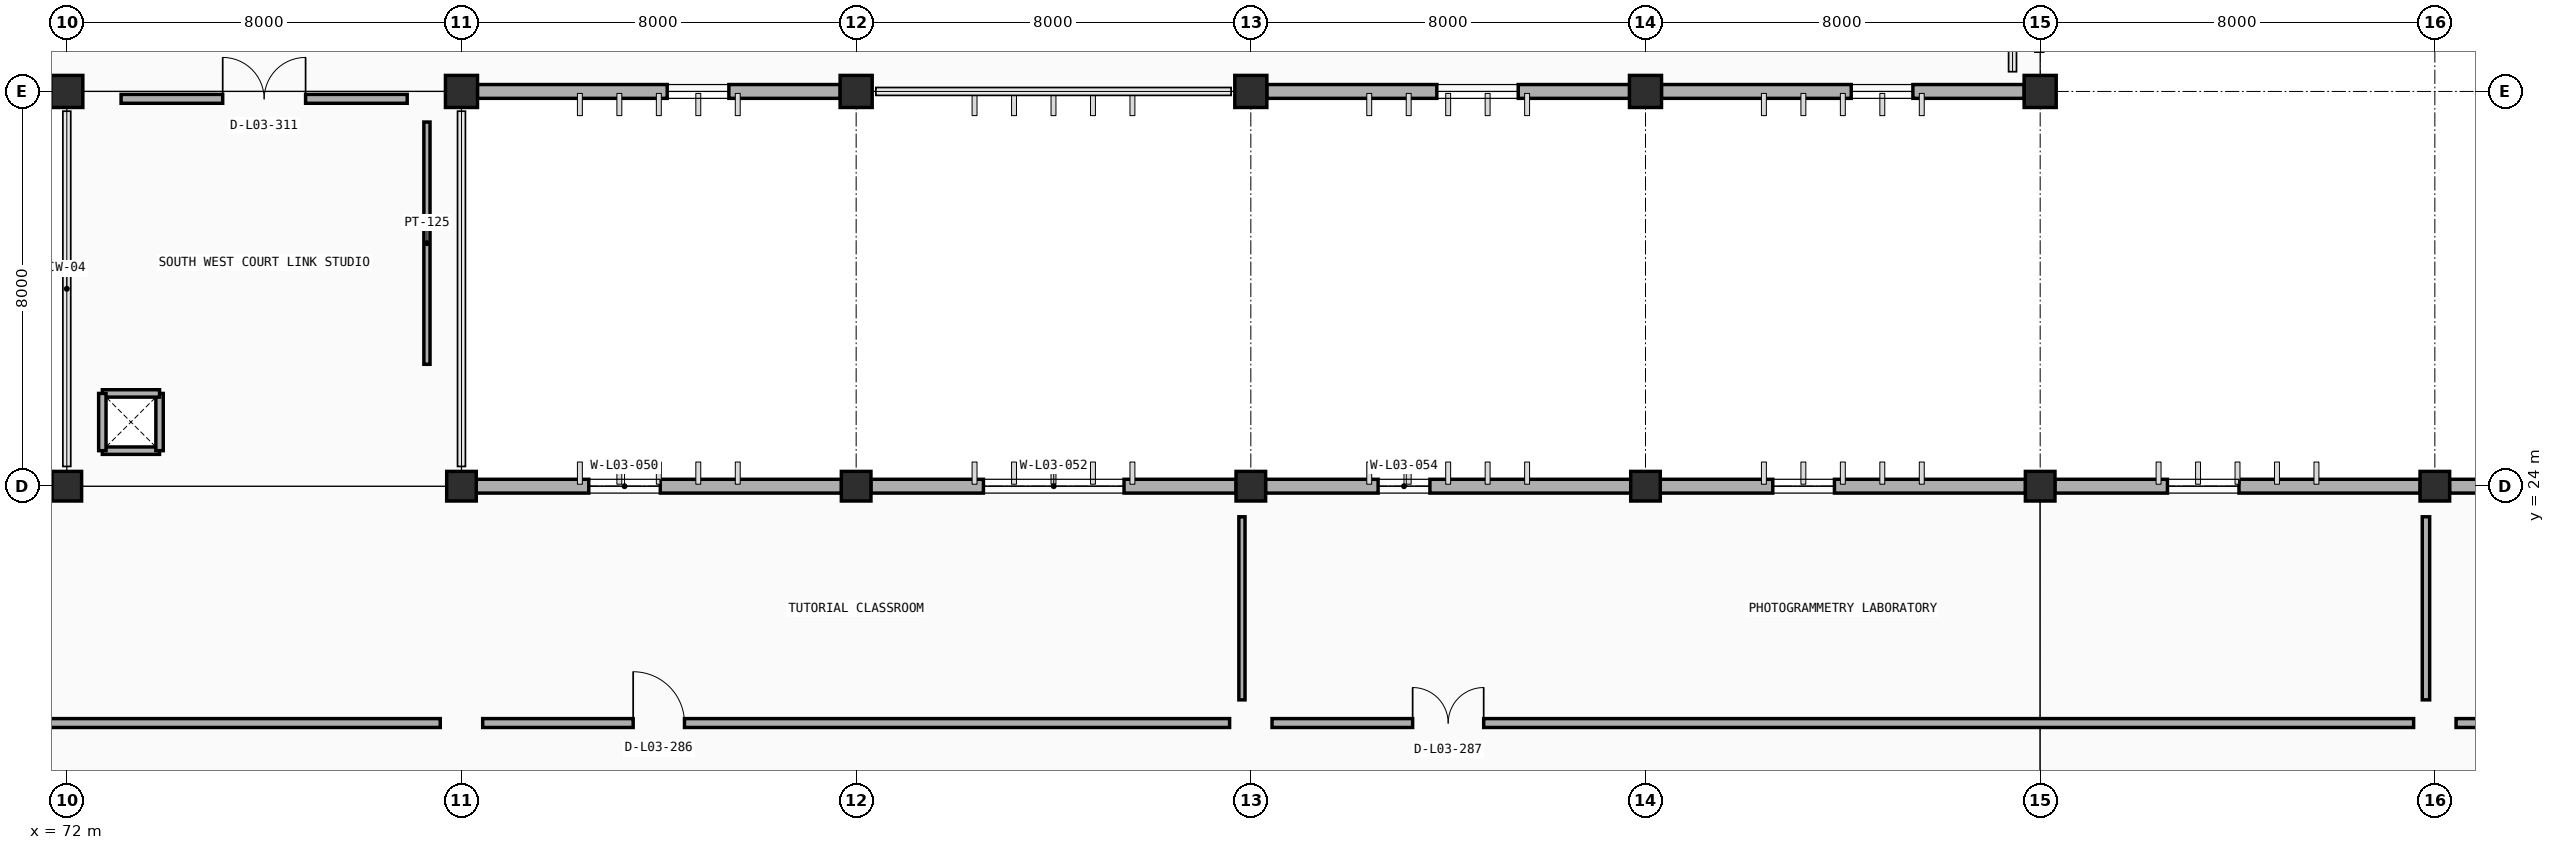
"""IFC4 building model, lengths in metres.
Left out: names, types, materials, properties, quantities, classifications, styles, units other than length and angle.
Written with IfcOpenShell. Run it as: python <this file> out.ifc"""

import sys

from ifc_helpers import new_model, si_unit, direction, frame, frame_2d, origin, origin_2d, place, context, subcontext, project, spatial, rectangle, extrude, element, fill, save


model = new_model("IFC4")
c1 = context("Model", 3, precision=1e-05, world=origin(), true_north=direction((0.0, 1.0)))
c2 = subcontext(c1, "Body", "Model", "MODEL_VIEW")
j1 = project(units=[si_unit("LENGTHUNIT", "METRE"), si_unit("PLANEANGLEUNIT", "RADIAN")], contexts=[c1])
p1 = place(None, origin())
s1 = spatial("IfcSite", under=j1, at=p1, CompositionType="ELEMENT")
p2 = place(p1, origin())
s2 = spatial("IfcBuilding", under=s1, at=p2, CompositionType="ELEMENT")
p3 = place(p2, frame((0.0, 0.0, 9.6)))
s3 = spatial("IfcBuildingStorey", under=s2, at=p3, CompositionType="ELEMENT", Elevation=9.6)
for number, where, z_axis, x_axis in (
    (1, (72.0, 24.0, 0.0), (0.0, 0.0, 1.0), (1.0, 0.0, 0.0)),
    (2, (80.0, 24.0, 0.0), (0.0, 0.0, 1.0), (1.0, 0.0, 0.0)),
    (3, (88.0, 24.0, 0.0), (0.0, 0.0, 1.0), (1.0, 0.0, 0.0)),
    (4, (96.0, 24.0, 0.0), (0.0, 0.0, 1.0), (1.0, 0.0, 0.0)),
    (5, (104.0, 24.0, 0.0), (0.0, 0.0, 1.0), (1.0, 0.0, 0.0)),
    (6, (112.0, 24.0, 0.0), (0.0, 0.0, 1.0), (1.0, 0.0, 0.0)),
    (7, (120.0, 24.0, 0.0), (0.0, 0.0, 1.0), (1.0, 0.0, 0.0)),
):
    element("IfcColumn", number, at=place(p3, frame(where, z_axis=z_axis, x_axis=x_axis)), inside=s3, PredefinedType="COLUMN", context=c2, shape_type="SweptSolid", body=[
        extrude(rectangle(XDim=0.6, YDim=0.6, at=origin_2d()), origin(), (0.0, 0.0, 1.0), 4.2),
    ])
for number, where, z_axis, x_axis in (
    (8, (72.0, 32.0, 0.0), (0.0, 0.0, 1.0), (1.0, 0.0, 0.0)),
    (9, (80.0, 32.0, 0.0), (0.0, 0.0, 1.0), (1.0, 0.0, 0.0)),
    (10, (88.0, 32.0, 0.0), (0.0, 0.0, 1.0), (1.0, 0.0, 0.0)),
    (11, (96.0, 32.0, 0.0), (0.0, 0.0, 1.0), (1.0, 0.0, 0.0)),
    (12, (104.0, 32.0, 0.0), (0.0, 0.0, 1.0), (1.0, 0.0, 0.0)),
    (13, (112.0, 32.0, 0.0), (0.0, 0.0, 1.0), (1.0, 0.0, 0.0)),
):
    element("IfcColumn", number, at=place(p3, frame(where, z_axis=z_axis, x_axis=x_axis)), inside=s3, PredefinedType="COLUMN", context=c2, shape_type="SweptSolid", body=[
        extrude(rectangle(XDim=0.65, YDim=0.65, at=origin_2d()), origin(), (0.0, 0.0, 1.0), 4.2),
    ])
p4 = place(p3, frame((64.297, 24.0, 0.0), z_axis=(0.0, 0.0, 1.0), x_axis=(1.0, 0.0, 0.0)))
e14 = element("IfcWall", 14, at=p4, inside=s3, PredefinedType="STANDARD", context=c2, shape_type="SweptSolid", body=[
    extrude(rectangle(XDim=7.406, YDim=0.28, at=frame_2d((3.703, 0.0))), origin(), (0.0, 0.0, 1.0), 3.325),
])
p5 = place(p4, frame((2.283, 0.0, 0.9)))
e15 = element("IfcOpeningElement", 15, at=p5, cuts=e14, PredefinedType="OPENING", context=c2, shape_type="SweptSolid", body=[
    extrude(rectangle(XDim=1.05, YDim=1.4, at=frame_2d((0.525, 0.7))), frame((0.0, 0.15, 0.0), z_axis=(0.0, -1.0, 0.0), x_axis=(1.0, 0.0, 0.0)), (0.0, 0.0, 1.0), 0.3),
])
p6 = place(p3, frame((80.297, 24.0, 0.0), z_axis=(0.0, 0.0, 1.0), x_axis=(1.0, 0.0, 0.0)))
e16 = element("IfcWall", 16, at=p6, inside=s3, PredefinedType="STANDARD", context=c2, shape_type="SweptSolid", body=[
    extrude(rectangle(XDim=7.406, YDim=0.28, at=frame_2d((3.703, 0.0))), origin(), (0.0, 0.0, 1.0), 3.325),
])
p7 = place(p6, frame((2.283, 0.0, 0.9)))
e17 = element("IfcOpeningElement", 17, at=p7, cuts=e16, PredefinedType="OPENING", context=c2, shape_type="SweptSolid", body=[
    extrude(rectangle(XDim=1.45, YDim=1.4, at=frame_2d((0.725, 0.7))), frame((0.0, 0.15, 0.0), z_axis=(0.0, -1.0, 0.0), x_axis=(1.0, 0.0, 0.0)), (0.0, 0.0, 1.0), 0.3),
])
p8 = place(p3, frame((88.297, 24.0, 0.0), z_axis=(0.0, 0.0, 1.0), x_axis=(1.0, 0.0, 0.0)))
e18 = element("IfcWall", 18, at=p8, inside=s3, PredefinedType="STANDARD", context=c2, shape_type="SweptSolid", body=[
    extrude(rectangle(XDim=7.406, YDim=0.28, at=frame_2d((3.703, 0.0))), origin(), (0.0, 0.0, 1.0), 3.325),
])
p9 = place(p8, frame((2.283, 0.0, 0.9)))
e19 = element("IfcOpeningElement", 19, at=p9, cuts=e18, PredefinedType="OPENING", context=c2, shape_type="SweptSolid", body=[
    extrude(rectangle(XDim=2.85, YDim=1.25, at=frame_2d((1.425, 0.625))), frame((0.0, 0.15, 0.0), z_axis=(0.0, -1.0, 0.0), x_axis=(1.0, 0.0, 0.0)), (0.0, 0.0, 1.0), 0.3),
])
p10 = place(p3, frame((96.297, 24.0, 0.0), z_axis=(0.0, 0.0, 1.0), x_axis=(1.0, 0.0, 0.0)))
e20 = element("IfcWall", 20, at=p10, inside=s3, PredefinedType="STANDARD", context=c2, shape_type="SweptSolid", body=[
    extrude(rectangle(XDim=7.406, YDim=0.28, at=frame_2d((3.703, 0.0))), origin(), (0.0, 0.0, 1.0), 3.325),
])
p11 = place(p10, frame((2.283, 0.0, 0.9)))
e21 = element("IfcOpeningElement", 21, at=p11, cuts=e20, PredefinedType="OPENING", context=c2, shape_type="SweptSolid", body=[
    extrude(rectangle(XDim=1.05, YDim=1.4, at=frame_2d((0.525, 0.7))), frame((0.0, 0.15, 0.0), z_axis=(0.0, -1.0, 0.0), x_axis=(1.0, 0.0, 0.0)), (0.0, 0.0, 1.0), 0.3),
])
p12 = place(p3, frame((104.297, 24.0, 0.0), z_axis=(0.0, 0.0, 1.0), x_axis=(1.0, 0.0, 0.0)))
e22 = element("IfcWall", 22, at=p12, inside=s3, PredefinedType="STANDARD", context=c2, shape_type="SweptSolid", body=[
    extrude(rectangle(XDim=7.406, YDim=0.28, at=frame_2d((3.703, 0.0))), origin(), (0.0, 0.0, 1.0), 3.325),
])
p13 = place(p12, frame((2.283, 0.0, 0.9)))
e23 = element("IfcOpeningElement", 23, at=p13, cuts=e22, PredefinedType="OPENING", context=c2, shape_type="SweptSolid", body=[
    extrude(rectangle(XDim=1.25, YDim=1.4, at=frame_2d((0.625, 0.7))), frame((0.0, 0.15, 0.0), z_axis=(0.0, -1.0, 0.0), x_axis=(1.0, 0.0, 0.0)), (0.0, 0.0, 1.0), 0.3),
])
p14 = place(p3, frame((112.297, 24.0, 0.0), z_axis=(0.0, 0.0, 1.0), x_axis=(1.0, 0.0, 0.0)))
e24 = element("IfcWall", 24, at=p14, inside=s3, PredefinedType="STANDARD", context=c2, shape_type="SweptSolid", body=[
    extrude(rectangle(XDim=7.406, YDim=0.28, at=frame_2d((3.703, 0.0))), origin(), (0.0, 0.0, 1.0), 3.325),
])
p15 = place(p14, frame((2.283, 0.0, 0.9)))
e25 = element("IfcOpeningElement", 25, at=p15, cuts=e24, PredefinedType="OPENING", context=c2, shape_type="SweptSolid", body=[
    extrude(rectangle(XDim=1.45, YDim=1.4, at=frame_2d((0.725, 0.7))), frame((0.0, 0.15, 0.0), z_axis=(0.0, -1.0, 0.0), x_axis=(1.0, 0.0, 0.0)), (0.0, 0.0, 1.0), 0.3),
])
p16 = place(p3, frame((120.297, 24.0, 0.0), z_axis=(0.0, 0.0, 1.0), x_axis=(1.0, 0.0, 0.0)))
e26 = element("IfcWall", 26, at=p16, inside=s3, PredefinedType="STANDARD", context=c2, shape_type="SweptSolid", body=[
    extrude(rectangle(XDim=7.406, YDim=0.28, at=frame_2d((3.703, 0.0))), origin(), (0.0, 0.0, 1.0), 3.325),
])
p17 = place(p16, frame((2.283, 0.0, 0.9)))
e27 = element("IfcOpeningElement", 27, at=p17, cuts=e26, PredefinedType="OPENING", context=c2, shape_type="SweptSolid", body=[
    extrude(rectangle(XDim=2.85, YDim=1.25, at=frame_2d((1.425, 0.625))), frame((0.0, 0.15, 0.0), z_axis=(0.0, -1.0, 0.0), x_axis=(1.0, 0.0, 0.0)), (0.0, 0.0, 1.0), 0.3),
])
p18 = place(p3, frame((87.678, 32.0, 0.0), z_axis=(0.0, 0.0, 1.0), x_axis=(-1.0, 0.0, 0.0)))
e28 = element("IfcWall", 28, at=p18, inside=s3, PredefinedType="STANDARD", context=c2, shape_type="SweptSolid", body=[
    extrude(rectangle(XDim=7.356, YDim=0.28, at=frame_2d((3.678, 0.0))), origin(), (0.0, 0.0, 1.0), 3.325),
])
p19 = place(p18, frame((2.258, 0.0, 0.9)))
e29 = element("IfcOpeningElement", 29, at=p19, cuts=e28, PredefinedType="OPENING", context=c2, shape_type="SweptSolid", body=[
    extrude(rectangle(XDim=1.25, YDim=1.55, at=frame_2d((0.625, 0.775))), frame((0.0, 0.15, 0.0), z_axis=(0.0, -1.0, 0.0), x_axis=(1.0, 0.0, 0.0)), (0.0, 0.0, 1.0), 0.3),
])
p20 = place(p3, frame((103.678, 32.0, 0.0), z_axis=(0.0, 0.0, 1.0), x_axis=(-1.0, 0.0, 0.0)))
e30 = element("IfcWall", 30, at=p20, inside=s3, PredefinedType="STANDARD", context=c2, shape_type="SweptSolid", body=[
    extrude(rectangle(XDim=7.356, YDim=0.28, at=frame_2d((3.678, 0.0))), origin(), (0.0, 0.0, 1.0), 3.325),
])
p21 = place(p20, frame((2.258, 0.0, 0.9)))
e31 = element("IfcOpeningElement", 31, at=p21, cuts=e30, PredefinedType="OPENING", context=c2, shape_type="SweptSolid", body=[
    extrude(rectangle(XDim=1.65, YDim=1.55, at=frame_2d((0.825, 0.775))), frame((0.0, 0.15, 0.0), z_axis=(0.0, -1.0, 0.0), x_axis=(1.0, 0.0, 0.0)), (0.0, 0.0, 1.0), 0.3),
])
p22 = place(p3, frame((111.678, 32.0, 0.0), z_axis=(0.0, 0.0, 1.0), x_axis=(-1.0, 0.0, 0.0)))
e32 = element("IfcWall", 32, at=p22, inside=s3, PredefinedType="STANDARD", context=c2, shape_type="SweptSolid", body=[
    extrude(rectangle(XDim=7.356, YDim=0.28, at=frame_2d((3.678, 0.0))), origin(), (0.0, 0.0, 1.0), 3.325),
])
p23 = place(p22, frame((2.258, 0.0, 0.9)))
e33 = element("IfcOpeningElement", 33, at=p23, cuts=e32, PredefinedType="OPENING", context=c2, shape_type="SweptSolid", body=[
    extrude(rectangle(XDim=1.25, YDim=1.55, at=frame_2d((0.625, 0.775))), frame((0.0, 0.15, 0.0), z_axis=(0.0, -1.0, 0.0), x_axis=(1.0, 0.0, 0.0)), (0.0, 0.0, 1.0), 0.3),
])
p24 = place(p3, frame((111.76, 32.22, 0.0), z_axis=(0.0, 0.0, 1.0), x_axis=(-1.0, 0.0, 0.0)))
e34 = element("IfcWall", 34, at=p24, inside=s3, PredefinedType="PARAPET", context=c2, shape_type="SweptSolid", body=[
    extrude(rectangle(XDim=0.32, YDim=0.2, at=frame_2d((0.16, 0.0))), origin(), (0.0, 0.0, 1.0), 3.35),
])
for number, where, z_axis, x_axis in (
    (35, (72.72, 24.72, 0.0), (0.0, 0.0, 1.0), (1.0, 0.0, 0.0)),
    (36, (73.88, 24.72, 0.0), (0.0, 0.0, 1.0), (0.0, 1.0, 0.0)),
    (37, (73.88, 25.88, 0.0), (0.0, 0.0, 1.0), (-1.0, 0.0, 0.0)),
    (38, (72.72, 25.88, 0.0), (0.0, 0.0, 1.0), (0.0, -1.0, 0.0)),
):
    element("IfcWall", number, at=place(p3, frame(where, z_axis=z_axis, x_axis=x_axis)), inside=s3, PredefinedType="PARTITIONING", context=c2, shape_type="SweptSolid", body=[
        extrude(rectangle(XDim=1.16, YDim=0.15, at=frame_2d((0.58, 0.0))), origin(), (0.0, 0.0, 1.0), 3.9),
    ])
p25 = place(p3, frame((56.43, 19.2, 0.0), z_axis=(0.0, 0.0, 1.0), x_axis=(1.0, 0.0, 0.0)))
e39 = element("IfcWall", 39, at=p25, inside=s3, PredefinedType="PARTITIONING", context=c2, shape_type="SweptSolid", body=[
    extrude(rectangle(XDim=23.14, YDim=0.18, at=frame_2d((11.57, 0.0))), origin(), (0.0, 0.0, 1.0), 3.3),
])
p26 = place(p25, frame((3.07, 0.0, 0.0)))
e40 = element("IfcOpeningElement", 40, at=p26, cuts=e39, PredefinedType="OPENING", context=c2, shape_type="SweptSolid", body=[
    extrude(rectangle(XDim=1.0, YDim=2.15, at=frame_2d((0.5, 1.075))), frame((0.0, 0.1, 0.0), z_axis=(0.0, -1.0, 0.0), x_axis=(1.0, 0.0, 0.0)), (0.0, 0.0, 1.0), 0.2),
])
p27 = place(p3, frame((80.43, 19.2, 0.0), z_axis=(0.0, 0.0, 1.0), x_axis=(1.0, 0.0, 0.0)))
e41 = element("IfcWall", 41, at=p27, inside=s3, PredefinedType="PARTITIONING", context=c2, shape_type="SweptSolid", body=[
    extrude(rectangle(XDim=15.14, YDim=0.18, at=frame_2d((7.57, 0.0))), origin(), (0.0, 0.0, 1.0), 3.3),
])
p28 = place(p27, frame((3.05, 0.0, 0.0)))
e42 = element("IfcOpeningElement", 42, at=p28, cuts=e41, PredefinedType="OPENING", context=c2, shape_type="SweptSolid", body=[
    extrude(rectangle(XDim=1.04, YDim=2.15, at=frame_2d((0.52, 1.075))), frame((0.0, 0.1, 0.0), z_axis=(0.0, -1.0, 0.0), x_axis=(1.0, 0.0, 0.0)), (0.0, 0.0, 1.0), 0.2),
])
p29 = place(p3, frame((95.82, 19.67, 0.0), z_axis=(0.0, 0.0, 1.0), x_axis=(0.0, 1.0, 0.0)))
e43 = element("IfcWall", 43, at=p29, inside=s3, PredefinedType="PARTITIONING", context=c2, shape_type="SweptSolid", body=[
    extrude(rectangle(XDim=3.71, YDim=0.125, at=frame_2d((1.855, 0.0))), origin(), (0.0, 0.0, 1.0), 3.225),
])
p30 = place(p3, frame((96.43, 19.2, 0.0), z_axis=(0.0, 0.0, 1.0), x_axis=(1.0, 0.0, 0.0)))
e44 = element("IfcWall", 44, at=p30, inside=s3, PredefinedType="PARTITIONING", context=c2, shape_type="SweptSolid", body=[
    extrude(rectangle(XDim=23.14, YDim=0.18, at=frame_2d((11.57, 0.0))), origin(), (0.0, 0.0, 1.0), 3.3),
])
p31 = place(p30, frame((2.85, 0.0, 0.0)))
e45 = element("IfcOpeningElement", 45, at=p31, cuts=e44, PredefinedType="OPENING", context=c2, shape_type="SweptSolid", body=[
    extrude(rectangle(XDim=1.44, YDim=2.2, at=frame_2d((0.72, 1.1))), frame((0.0, 0.1, 0.0), z_axis=(0.0, -1.0, 0.0), x_axis=(1.0, 0.0, 0.0)), (0.0, 0.0, 1.0), 0.2),
])
p32 = place(p3, frame((119.82, 19.67, 0.0), z_axis=(0.0, 0.0, 1.0), x_axis=(0.0, 1.0, 0.0)))
e46 = element("IfcWall", 46, at=p32, inside=s3, PredefinedType="PARTITIONING", context=c2, shape_type="SweptSolid", body=[
    extrude(rectangle(XDim=3.71, YDim=0.15, at=frame_2d((1.855, 0.0))), origin(), (0.0, 0.0, 1.0), 3.225),
])
p33 = place(p3, frame((120.43, 19.2, 0.0), z_axis=(0.0, 0.0, 1.0), x_axis=(1.0, 0.0, 0.0)))
e47 = element("IfcWall", 47, at=p33, inside=s3, PredefinedType="PARTITIONING", context=c2, shape_type="SweptSolid", body=[
    extrude(rectangle(XDim=23.14, YDim=0.18, at=frame_2d((11.57, 0.0))), origin(), (0.0, 0.0, 1.0), 3.3),
])
p34 = place(p33, frame((2.74, 0.0, 0.0)))
e48 = element("IfcOpeningElement", 48, at=p34, cuts=e47, PredefinedType="OPENING", context=c2, shape_type="SweptSolid", body=[
    extrude(rectangle(XDim=1.66, YDim=2.22, at=frame_2d((0.83, 1.11))), frame((0.0, 0.1, 0.0), z_axis=(0.0, -1.0, 0.0), x_axis=(1.0, 0.0, 0.0)), (0.0, 0.0, 1.0), 0.2),
])
p35 = place(p3, frame((73.1, 31.85, 0.0), z_axis=(0.0, 0.0, 1.0), x_axis=(1.0, 0.0, 0.0)))
e49 = element("IfcWall", 49, at=p35, inside=s3, PredefinedType="PARTITIONING", context=c2, shape_type="SweptSolid", body=[
    extrude(rectangle(XDim=5.8, YDim=0.18, at=frame_2d((2.9, 0.0))), origin(), (0.0, 0.0, 1.0), 3.3),
])
p36 = place(p35, frame((2.06, 0.0, 0.0)))
e50 = element("IfcOpeningElement", 50, at=p36, cuts=e49, PredefinedType="OPENING", context=c2, shape_type="SweptSolid", body=[
    extrude(rectangle(XDim=1.68, YDim=2.25, at=frame_2d((0.84, 1.125))), frame((0.0, 0.1, 0.0), z_axis=(0.0, -1.0, 0.0), x_axis=(1.0, 0.0, 0.0)), (0.0, 0.0, 1.0), 0.2),
])
p37 = place(p3, frame((79.3, 26.47, 0.0), z_axis=(0.0, 0.0, 1.0), x_axis=(0.0, 1.0, 0.0)))
e51 = element("IfcWall", 51, at=p37, inside=s3, PredefinedType="PARTITIONING", context=c2, shape_type="SweptSolid", body=[
    extrude(rectangle(XDim=4.91, YDim=0.125, at=frame_2d((2.455, 0.0))), origin(), (0.0, 0.0, 1.0), 3.3),
])
p38 = place(p7, origin())
e52 = element("IfcWindow", 52, at=p38, inside=s3, PartitioningType="SINGLE_PANEL", PredefinedType="WINDOW", context=c2, shape_type="SweptSolid", body=[
    extrude(rectangle(XDim=1.45, YDim=1.4, at=frame_2d((0.725, 0.7))), frame((0.0, 0.03, 0.0), z_axis=(0.0, -1.0, 0.0), x_axis=(1.0, 0.0, 0.0)), (0.0, 0.0, 1.0), 0.06),
])
fill(e17, e52)
p39 = place(p9, origin())
e53 = element("IfcWindow", 53, at=p39, inside=s3, PartitioningType="DOUBLE_PANEL_VERTICAL", PredefinedType="WINDOW", context=c2, shape_type="SweptSolid", body=[
    extrude(rectangle(XDim=2.85, YDim=1.25, at=frame_2d((1.425, 0.625))), frame((0.0, 0.03, 0.0), z_axis=(0.0, -1.0, 0.0), x_axis=(1.0, 0.0, 0.0)), (0.0, 0.0, 1.0), 0.06),
])
fill(e19, e53)
p40 = place(p11, origin())
e54 = element("IfcWindow", 54, at=p40, inside=s3, PartitioningType="SINGLE_PANEL", PredefinedType="WINDOW", context=c2, shape_type="SweptSolid", body=[
    extrude(rectangle(XDim=1.05, YDim=1.4, at=frame_2d((0.525, 0.7))), frame((0.0, 0.03, 0.0), z_axis=(0.0, -1.0, 0.0), x_axis=(1.0, 0.0, 0.0)), (0.0, 0.0, 1.0), 0.06),
])
fill(e21, e54)
p41 = place(p13, origin())
e55 = element("IfcWindow", 55, at=p41, inside=s3, PartitioningType="SINGLE_PANEL", PredefinedType="WINDOW", context=c2, shape_type="SweptSolid", body=[
    extrude(rectangle(XDim=1.25, YDim=1.4, at=frame_2d((0.625, 0.7))), frame((0.0, 0.03, 0.0), z_axis=(0.0, -1.0, 0.0), x_axis=(1.0, 0.0, 0.0)), (0.0, 0.0, 1.0), 0.06),
])
fill(e23, e55)
p42 = place(p15, origin())
e56 = element("IfcWindow", 56, at=p42, inside=s3, PartitioningType="SINGLE_PANEL", PredefinedType="WINDOW", context=c2, shape_type="SweptSolid", body=[
    extrude(rectangle(XDim=1.45, YDim=1.4, at=frame_2d((0.725, 0.7))), frame((0.0, 0.03, 0.0), z_axis=(0.0, -1.0, 0.0), x_axis=(1.0, 0.0, 0.0)), (0.0, 0.0, 1.0), 0.06),
])
fill(e25, e56)
p43 = place(p19, origin())
e57 = element("IfcWindow", 57, at=p43, inside=s3, PartitioningType="SINGLE_PANEL", PredefinedType="WINDOW", context=c2, shape_type="SweptSolid", body=[
    extrude(rectangle(XDim=1.25, YDim=1.55, at=frame_2d((0.625, 0.775))), frame((0.0, 0.03, 0.0), z_axis=(0.0, -1.0, 0.0), x_axis=(1.0, 0.0, 0.0)), (0.0, 0.0, 1.0), 0.06),
])
fill(e29, e57)
p44 = place(p21, origin())
e58 = element("IfcWindow", 58, at=p44, inside=s3, PartitioningType="DOUBLE_PANEL_VERTICAL", PredefinedType="WINDOW", context=c2, shape_type="SweptSolid", body=[
    extrude(rectangle(XDim=1.65, YDim=1.55, at=frame_2d((0.825, 0.775))), frame((0.0, 0.03, 0.0), z_axis=(0.0, -1.0, 0.0), x_axis=(1.0, 0.0, 0.0)), (0.0, 0.0, 1.0), 0.06),
])
fill(e31, e58)
p45 = place(p23, origin())
e59 = element("IfcWindow", 59, at=p45, inside=s3, PartitioningType="SINGLE_PANEL", PredefinedType="WINDOW", context=c2, shape_type="SweptSolid", body=[
    extrude(rectangle(XDim=1.25, YDim=1.55, at=frame_2d((0.625, 0.775))), frame((0.0, 0.03, 0.0), z_axis=(0.0, -1.0, 0.0), x_axis=(1.0, 0.0, 0.0)), (0.0, 0.0, 1.0), 0.06),
])
fill(e33, e59)
p46 = place(p28, origin())
e60 = element("IfcDoor", 60, at=p46, inside=s3, OperationType="SINGLE_SWING_LEFT", PredefinedType="DOOR", context=c2, shape_type="SweptSolid", body=[
    extrude(rectangle(XDim=1.04, YDim=2.15, at=frame_2d((0.52, 1.075))), frame((0.0, 0.025, 0.0), z_axis=(0.0, -1.0, 0.0), x_axis=(1.0, 0.0, 0.0)), (0.0, 0.0, 1.0), 0.05),
])
fill(e42, e60)
p47 = place(p31, origin())
e61 = element("IfcDoor", 61, at=p47, inside=s3, OperationType="DOUBLE_DOOR_SINGLE_SWING", PredefinedType="DOOR", context=c2, shape_type="SweptSolid", body=[
    extrude(rectangle(XDim=1.44, YDim=2.2, at=frame_2d((0.72, 1.1))), frame((0.0, 0.025, 0.0), z_axis=(0.0, -1.0, 0.0), x_axis=(1.0, 0.0, 0.0)), (0.0, 0.0, 1.0), 0.05),
])
fill(e45, e61)
p48 = place(p36, origin())
e62 = element("IfcDoor", 62, at=p48, inside=s3, OperationType="DOUBLE_DOOR_SINGLE_SWING", PredefinedType="DOOR", context=c2, shape_type="SweptSolid", body=[
    extrude(rectangle(XDim=1.68, YDim=2.25, at=frame_2d((0.84, 1.125))), frame((0.0, 0.025, 0.0), z_axis=(0.0, -1.0, 0.0), x_axis=(1.0, 0.0, 0.0)), (0.0, 0.0, 1.0), 0.05),
])
fill(e50, e62)
save(model, sys.argv[1])
